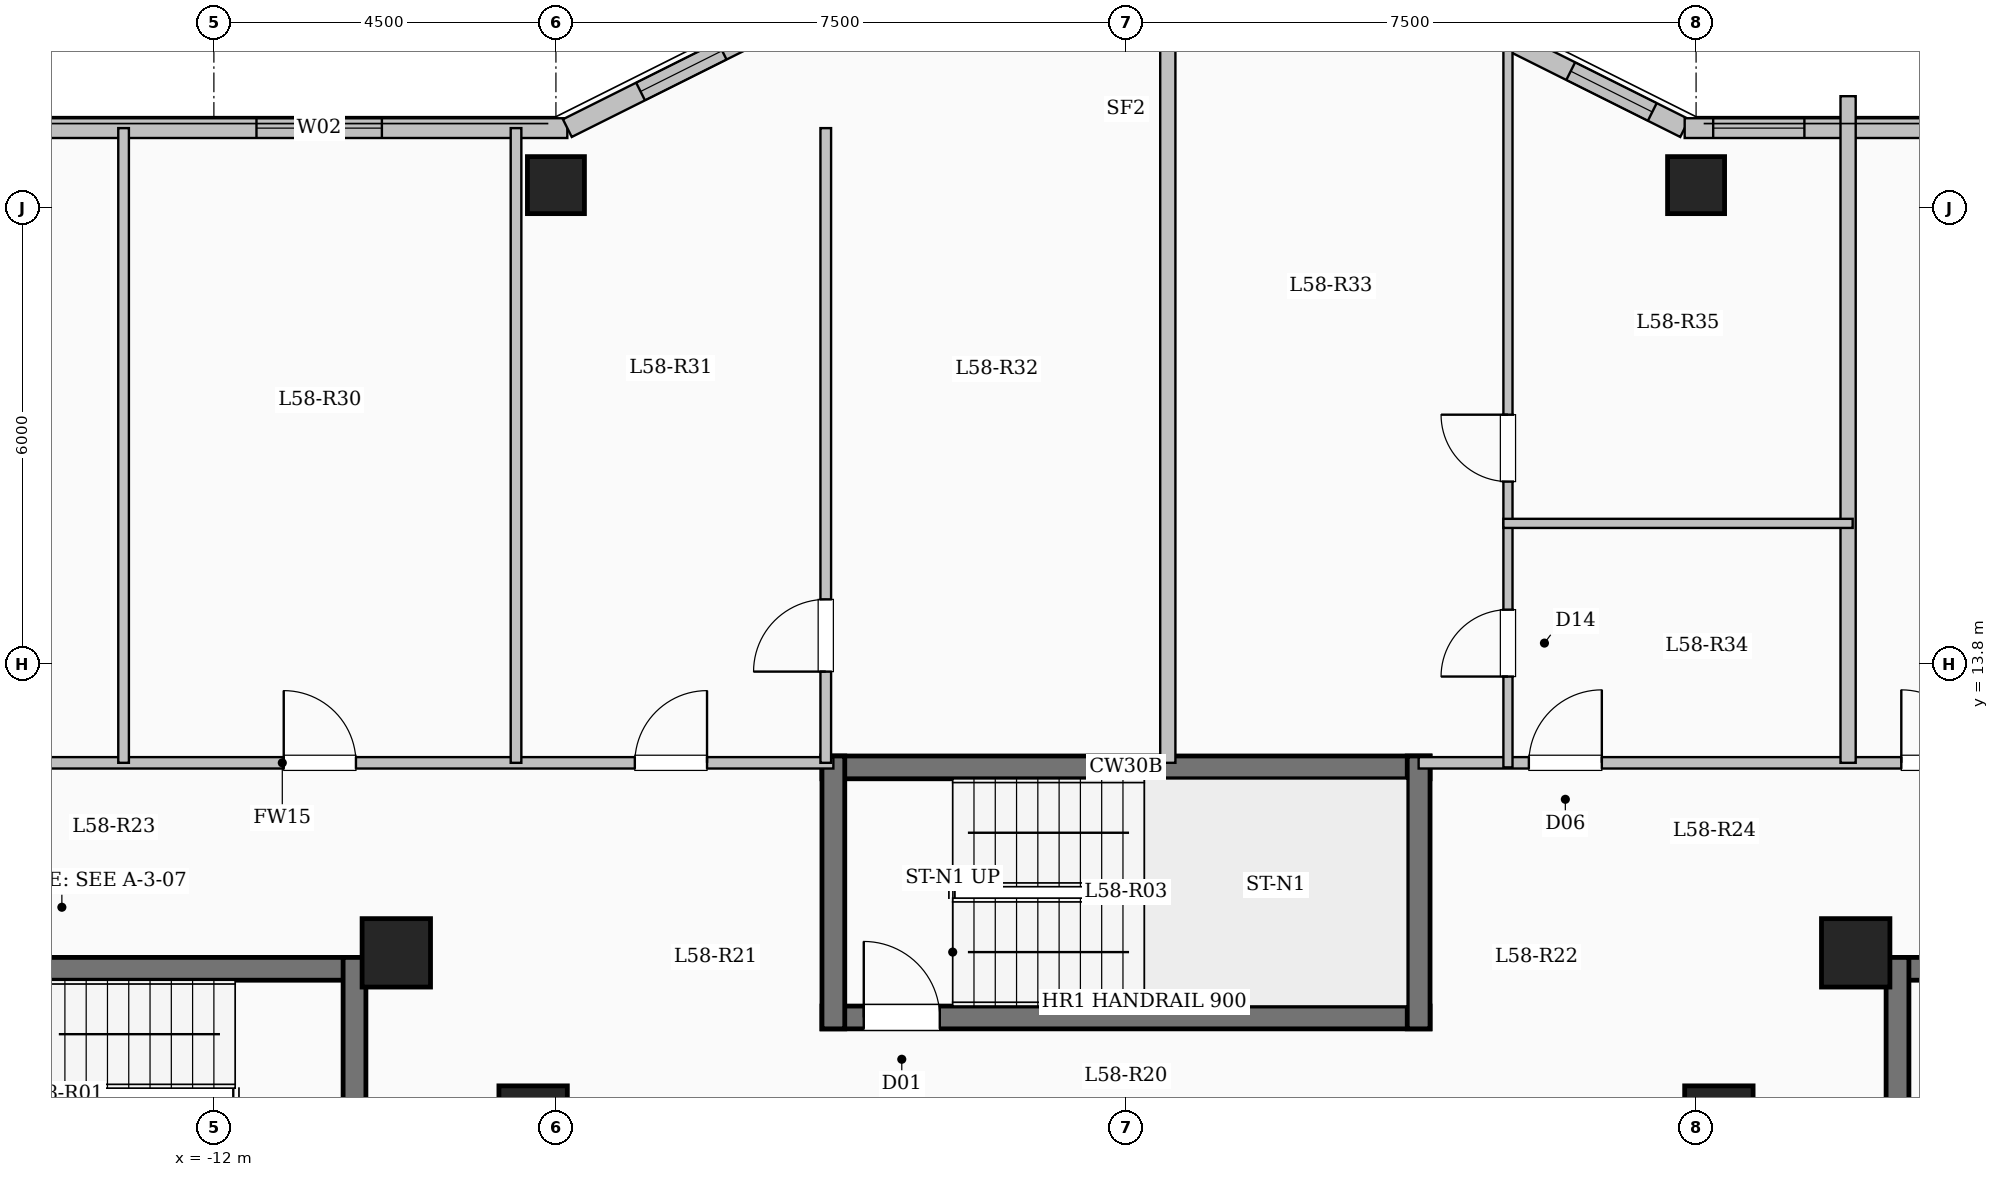
"""IFC4 building model, lengths in metres.
Left out: names, types, materials, properties, quantities, classifications, styles, units other than length and angle.
Written with IfcOpenShell. Run it as: python <this file> out.ifc"""

import sys

from ifc_helpers import new_model, si_unit, direction, frame, frame_2d, origin, origin_2d, place, context, subcontext, project, spatial, rectangle, extrude, element, fill, save


model = new_model("IFC4")
c1 = context("Model", 3, precision=1e-05, world=origin(), true_north=direction((0.0, 1.0)))
c2 = subcontext(c1, "Body", "Model", "MODEL_VIEW")
j1 = project(units=[si_unit("LENGTHUNIT", "METRE"), si_unit("PLANEANGLEUNIT", "RADIAN")], contexts=[c1])
p1 = place(None, origin())
s1 = spatial("IfcSite", under=j1, at=p1, CompositionType="ELEMENT")
p2 = place(p1, origin())
s2 = spatial("IfcBuilding", under=s1, at=p2, CompositionType="ELEMENT")
p3 = place(p2, frame((0.0, 0.0, 213.7)))
s3 = spatial("IfcBuildingStorey", under=s2, at=p3, CompositionType="ELEMENT", Elevation=213.7)
for number, where, z_axis, x_axis in (
    (1, (-7.8, 7.8, 0.0), (0.0, 0.0, 1.0), (1.0, 0.0, 0.0)),
    (2, (7.8, 7.8, 0.0), (0.0, 0.0, 1.0), (1.0, 0.0, 0.0)),
    (3, (-9.6, 10.0, 0.0), (0.0, 0.0, 1.0), (1.0, 0.0, 0.0)),
    (4, (9.6, 10.0, 0.0), (0.0, 0.0, 1.0), (1.0, 0.0, 0.0)),
):
    element("IfcColumn", number, at=place(p3, frame(where, z_axis=z_axis, x_axis=x_axis)), inside=s3, PredefinedType="COLUMN", context=c2, shape_type="SweptSolid", body=[
        extrude(rectangle(XDim=0.9, YDim=0.9, at=origin_2d()), origin(), (0.0, 0.0, 1.0), 3.35),
    ])
for number, where, z_axis, x_axis in (
    (5, (-7.5, 20.1, 0.0), (0.0, 0.0, 1.0), (1.0, 0.0, 0.0)),
    (6, (7.5, 20.1, 0.0), (0.0, 0.0, 1.0), (1.0, 0.0, 0.0)),
):
    element("IfcColumn", number, at=place(p3, frame(where, z_axis=z_axis, x_axis=x_axis)), inside=s3, PredefinedType="COLUMN", context=c2, shape_type="SweptSolid", body=[
        extrude(rectangle(XDim=0.75, YDim=0.75, at=origin_2d()), origin(), (0.0, 0.0, 1.0), 3.35),
    ])
p4 = place(p3, frame((-18.45, 20.85, 0.0), z_axis=(0.0, 0.0, 1.0), x_axis=(1.0, 0.0, 0.0)))
e7 = element("IfcWall", 7, at=p4, inside=s3, PredefinedType="SOLIDWALL", context=c2, shape_type="SweptSolid", body=[
    extrude(rectangle(XDim=11.1, YDim=0.26, at=frame_2d((5.55, 0.0))), origin(), (0.0, 0.0, 1.0), 3.1),
])
p5 = place(p4, frame((1.637, 0.0, 0.9)))
e8 = element("IfcOpeningElement", 8, at=p5, cuts=e7, PredefinedType="OPENING", context=c2, shape_type="SweptSolid", body=[
    extrude(rectangle(XDim=2.0, YDim=1.7, at=frame_2d((1.0, 0.85))), frame((0.0, 0.14, 0.0), z_axis=(0.0, -1.0, 0.0), x_axis=(1.0, 0.0, 0.0)), (0.0, 0.0, 1.0), 0.28),
])
p6 = place(p4, frame((7.01, 0.0, 0.9)))
e9 = element("IfcOpeningElement", 9, at=p6, cuts=e7, PredefinedType="OPENING", context=c2, shape_type="SweptSolid", body=[
    extrude(rectangle(XDim=1.65, YDim=1.6, at=frame_2d((0.825, 0.8))), frame((0.0, 0.14, 0.0), z_axis=(0.0, -1.0, 0.0), x_axis=(1.0, 0.0, 0.0)), (0.0, 0.0, 1.0), 0.28),
])
p7 = place(p3, frame((-7.35, 20.85, 0.0), z_axis=(0.0, 0.0, 1.0), x_axis=(0.894427191, 0.4472135955, 0.0)))
e10 = element("IfcWall", 10, at=p7, inside=s3, PredefinedType="SOLIDWALL", context=c2, shape_type="SweptSolid", body=[
    extrude(rectangle(XDim=3.354, YDim=0.26, at=frame_2d((1.677, 0.0))), origin(), (0.0, 0.0, 1.0), 3.1),
])
p8 = place(p7, frame((1.077, 0.0, 0.95)))
e11 = element("IfcOpeningElement", 11, at=p8, cuts=e10, PredefinedType="OPENING", context=c2, shape_type="SweptSolid", body=[
    extrude(rectangle(XDim=1.2, YDim=1.5, at=frame_2d((0.6, 0.75))), frame((0.0, 0.14, 0.0), z_axis=(0.0, -1.0, 0.0), x_axis=(1.0, 0.0, 0.0)), (0.0, 0.0, 1.0), 0.28),
])
p9 = place(p3, frame((4.35, 22.35, 0.0), z_axis=(0.0, 0.0, 1.0), x_axis=(0.894427191, -0.4472135955, 0.0)))
e12 = element("IfcWall", 12, at=p9, inside=s3, PredefinedType="SOLIDWALL", context=c2, shape_type="SweptSolid", body=[
    extrude(rectangle(XDim=3.354, YDim=0.26, at=frame_2d((1.677, 0.0))), origin(), (0.0, 0.0, 1.0), 3.1),
])
p10 = place(p9, frame((1.678, 0.0, 0.95)))
e13 = element("IfcOpeningElement", 13, at=p10, cuts=e12, PredefinedType="OPENING", context=c2, shape_type="SweptSolid", body=[
    extrude(rectangle(XDim=1.2, YDim=1.5, at=frame_2d((0.6, 0.75))), frame((0.0, 0.14, 0.0), z_axis=(0.0, -1.0, 0.0), x_axis=(1.0, 0.0, 0.0)), (0.0, 0.0, 1.0), 0.28),
])
p11 = place(p3, frame((7.35, 20.85, 0.0), z_axis=(0.0, 0.0, 1.0), x_axis=(1.0, 0.0, 0.0)))
e14 = element("IfcWall", 14, at=p11, inside=s3, PredefinedType="SOLIDWALL", context=c2, shape_type="SweptSolid", body=[
    extrude(rectangle(XDim=11.1, YDim=0.26, at=frame_2d((5.55, 0.0))), origin(), (0.0, 0.0, 1.0), 3.1),
])
p12 = place(p11, frame((0.375, 0.0, 0.95)))
e15 = element("IfcOpeningElement", 15, at=p12, cuts=e14, PredefinedType="OPENING", context=c2, shape_type="SweptSolid", body=[
    extrude(rectangle(XDim=1.2, YDim=1.5, at=frame_2d((0.6, 0.75))), frame((0.0, 0.14, 0.0), z_axis=(0.0, -1.0, 0.0), x_axis=(1.0, 0.0, 0.0)), (0.0, 0.0, 1.0), 0.28),
])
p13 = place(p11, frame((3.245, 0.0, 0.9)))
e16 = element("IfcOpeningElement", 16, at=p13, cuts=e14, PredefinedType="OPENING", context=c2, shape_type="SweptSolid", body=[
    extrude(rectangle(XDim=2.2, YDim=1.75, at=frame_2d((1.1, 0.875))), frame((0.0, 0.14, 0.0), z_axis=(0.0, -1.0, 0.0), x_axis=(1.0, 0.0, 0.0)), (0.0, 0.0, 1.0), 0.28),
])
p14 = place(p11, frame((7.965, 0.0, 0.9)))
e17 = element("IfcOpeningElement", 17, at=p14, cuts=e14, PredefinedType="OPENING", context=c2, shape_type="SweptSolid", body=[
    extrude(rectangle(XDim=1.65, YDim=1.6, at=frame_2d((0.825, 0.8))), frame((0.0, 0.14, 0.0), z_axis=(0.0, -1.0, 0.0), x_axis=(1.0, 0.0, 0.0)), (0.0, 0.0, 1.0), 0.28),
])
p15 = place(p3, frame((-18.0, 9.79, 0.0), z_axis=(0.0, 0.0, 1.0), x_axis=(1.0, 0.0, 0.0)))
e18 = element("IfcWall", 18, at=p15, inside=s3, PredefinedType="SHEAR", context=c2, shape_type="SweptSolid", body=[
    extrude(rectangle(XDim=8.0, YDim=0.3, at=frame_2d((4.0, 0.0))), origin(), (0.0, 0.0, 1.0), 3.35),
])
p16 = place(p3, frame((-10.15, 6.35, 0.0), z_axis=(0.0, 0.0, 1.0), x_axis=(0.0, 1.0, 0.0)))
e19 = element("IfcWall", 19, at=p16, inside=s3, PredefinedType="SHEAR", context=c2, shape_type="SweptSolid", body=[
    extrude(rectangle(XDim=3.59, YDim=0.3, at=frame_2d((1.795, 0.0))), origin(), (0.0, 0.0, 1.0), 3.35),
])
p17 = place(p3, frame((10.0, 9.79, 0.0), z_axis=(0.0, 0.0, 1.0), x_axis=(1.0, 0.0, 0.0)))
e20 = element("IfcWall", 20, at=p17, inside=s3, PredefinedType="SHEAR", context=c2, shape_type="SweptSolid", body=[
    extrude(rectangle(XDim=8.0, YDim=0.3, at=frame_2d((4.0, 0.0))), origin(), (0.0, 0.0, 1.0), 3.35),
])
p18 = place(p3, frame((10.15, 6.35, 0.0), z_axis=(0.0, 0.0, 1.0), x_axis=(0.0, 1.0, 0.0)))
e21 = element("IfcWall", 21, at=p18, inside=s3, PredefinedType="SHEAR", context=c2, shape_type="SweptSolid", body=[
    extrude(rectangle(XDim=3.59, YDim=0.3, at=frame_2d((1.795, 0.0))), origin(), (0.0, 0.0, 1.0), 3.35),
])
p19 = place(p3, frame((-4.0, 12.44, 0.0), z_axis=(0.0, 0.0, 1.0), x_axis=(1.0, 0.0, 0.0)))
e22 = element("IfcWall", 22, at=p19, inside=s3, PredefinedType="SHEAR", context=c2, shape_type="SweptSolid", body=[
    extrude(rectangle(XDim=8.0, YDim=0.3, at=frame_2d((4.0, 0.0))), origin(), (0.0, 0.0, 1.0), 3.35),
])
p20 = place(p3, frame((-4.0, 9.15, 0.0), z_axis=(0.0, 0.0, 1.0), x_axis=(1.0, 0.0, 0.0)))
e23 = element("IfcWall", 23, at=p20, inside=s3, PredefinedType="SHEAR", context=c2, shape_type="SweptSolid", body=[
    extrude(rectangle(XDim=8.0, YDim=0.3, at=frame_2d((4.0, 0.0))), origin(), (0.0, 0.0, 1.0), 3.35),
])
p21 = place(p20, frame((0.55, 0.0, 0.0)))
e24 = element("IfcOpeningElement", 24, at=p21, cuts=e23, PredefinedType="OPENING", context=c2, shape_type="SweptSolid", body=[
    extrude(rectangle(XDim=1.0, YDim=2.15, at=frame_2d((0.5, 1.075))), frame((0.0, 0.16, 0.0), z_axis=(0.0, -1.0, 0.0), x_axis=(1.0, 0.0, 0.0)), (0.0, 0.0, 1.0), 0.32),
])
for number, where, z_axis, x_axis in (
    (25, (-3.85, 9.0, 0.0), (0.0, 0.0, 1.0), (0.0, 1.0, 0.0)),
    (26, (3.85, 9.0, 0.0), (0.0, 0.0, 1.0), (0.0, 1.0, 0.0)),
):
    element("IfcWall", number, at=place(p3, frame(where, z_axis=z_axis, x_axis=x_axis)), inside=s3, PredefinedType="SHEAR", context=c2, shape_type="SweptSolid", body=[
        extrude(rectangle(XDim=3.59, YDim=0.3, at=frame_2d((1.795, 0.0))), origin(), (0.0, 0.0, 1.0), 3.35),
    ])
p22 = place(p3, frame((-18.35, 12.5, 0.0), z_axis=(0.0, 0.0, 1.0), x_axis=(1.0, 0.0, 0.0)))
e27 = element("IfcWall", 27, at=p22, inside=s3, PredefinedType="PARTITIONING", context=c2, shape_type="SweptSolid", body=[
    extrude(rectangle(XDim=14.5, YDim=0.15, at=frame_2d((7.25, 0.0))), origin(), (0.0, 0.0, 1.0), 3.1),
])
p23 = place(p22, frame((2.076, 0.0, 0.0)))
e28 = element("IfcOpeningElement", 28, at=p23, cuts=e27, PredefinedType="OPENING", context=c2, shape_type="SweptSolid", body=[
    extrude(rectangle(XDim=0.95, YDim=2.15, at=frame_2d((0.475, 1.075))), frame((0.0, 0.085, 0.0), z_axis=(0.0, -1.0, 0.0), x_axis=(1.0, 0.0, 0.0)), (0.0, 0.0, 1.0), 0.17),
])
p24 = place(p22, frame((7.269, 0.0, 0.0)))
e29 = element("IfcOpeningElement", 29, at=p24, cuts=e27, PredefinedType="OPENING", context=c2, shape_type="SweptSolid", body=[
    extrude(rectangle(XDim=0.95, YDim=2.15, at=frame_2d((0.475, 1.075))), frame((0.0, 0.085, 0.0), z_axis=(0.0, -1.0, 0.0), x_axis=(1.0, 0.0, 0.0)), (0.0, 0.0, 1.0), 0.17),
])
p25 = place(p22, frame((11.888, 0.0, 0.0)))
e30 = element("IfcOpeningElement", 30, at=p25, cuts=e27, PredefinedType="OPENING", context=c2, shape_type="SweptSolid", body=[
    extrude(rectangle(XDim=0.95, YDim=2.15, at=frame_2d((0.475, 1.075))), frame((0.0, 0.085, 0.0), z_axis=(0.0, -1.0, 0.0), x_axis=(1.0, 0.0, 0.0)), (0.0, 0.0, 1.0), 0.17),
])
p26 = place(p3, frame((3.85, 12.5, 0.0), z_axis=(0.0, 0.0, 1.0), x_axis=(1.0, 0.0, 0.0)))
e31 = element("IfcWall", 31, at=p26, inside=s3, PredefinedType="PARTITIONING", context=c2, shape_type="SweptSolid", body=[
    extrude(rectangle(XDim=14.5, YDim=0.15, at=frame_2d((7.25, 0.0))), origin(), (0.0, 0.0, 1.0), 3.1),
])
p27 = place(p26, frame((1.45, 0.0, 0.0)))
e32 = element("IfcOpeningElement", 32, at=p27, cuts=e31, PredefinedType="OPENING", context=c2, shape_type="SweptSolid", body=[
    extrude(rectangle(XDim=0.96, YDim=2.15, at=frame_2d((0.48, 1.075))), frame((0.0, 0.085, 0.0), z_axis=(0.0, -1.0, 0.0), x_axis=(1.0, 0.0, 0.0)), (0.0, 0.0, 1.0), 0.17),
])
p28 = place(p26, frame((6.35, 0.0, 0.0)))
e33 = element("IfcOpeningElement", 33, at=p28, cuts=e31, PredefinedType="OPENING", context=c2, shape_type="SweptSolid", body=[
    extrude(rectangle(XDim=0.96, YDim=2.15, at=frame_2d((0.48, 1.075))), frame((0.0, 0.085, 0.0), z_axis=(0.0, -1.0, 0.0), x_axis=(1.0, 0.0, 0.0)), (0.0, 0.0, 1.0), 0.17),
])
p29 = place(p3, frame((0.55, 12.5, 0.0), z_axis=(0.0, 0.0, 1.0), x_axis=(0.0, 1.0, 0.0)))
e34 = element("IfcWall", 34, at=p29, inside=s3, PredefinedType="SOLIDWALL", context=c2, shape_type="SweptSolid", body=[
    extrude(rectangle(XDim=9.88, YDim=0.2, at=frame_2d((4.94, 0.0))), origin(), (0.0, 0.0, 1.0), 3.1),
])
p30 = place(p3, frame((-3.95, 12.5, 0.0), z_axis=(0.0, 0.0, 1.0), x_axis=(0.0, 1.0, 0.0)))
e35 = element("IfcWall", 35, at=p30, inside=s3, PredefinedType="PARTITIONING", context=c2, shape_type="SweptSolid", body=[
    extrude(rectangle(XDim=8.35, YDim=0.14, at=frame_2d((4.175, 0.0))), origin(), (0.0, 0.0, 1.0), 3.1),
])
p31 = place(p30, frame((1.2, 0.0, 0.0)))
e36 = element("IfcOpeningElement", 36, at=p31, cuts=e35, PredefinedType="OPENING", context=c2, shape_type="SweptSolid", body=[
    extrude(rectangle(XDim=0.95, YDim=2.15, at=frame_2d((0.475, 1.075))), frame((0.0, 0.08, 0.0), z_axis=(0.0, -1.0, 0.0), x_axis=(1.0, 0.0, 0.0)), (0.0, 0.0, 1.0), 0.16),
])
p32 = place(p3, frame((-13.188, 12.5, 0.0), z_axis=(0.0, 0.0, 1.0), x_axis=(0.0, 1.0, 0.0)))
e37 = element("IfcWall", 37, at=p32, inside=s3, PredefinedType="PARTITIONING", context=c2, shape_type="SweptSolid", body=[
    extrude(rectangle(XDim=8.35, YDim=0.14, at=frame_2d((4.175, 0.0))), origin(), (0.0, 0.0, 1.0), 3.1),
])
p33 = place(p3, frame((-8.025, 12.5, 0.0), z_axis=(0.0, 0.0, 1.0), x_axis=(0.0, 1.0, 0.0)))
e38 = element("IfcWall", 38, at=p33, inside=s3, PredefinedType="PARTITIONING", context=c2, shape_type="SweptSolid", body=[
    extrude(rectangle(XDim=8.35, YDim=0.14, at=frame_2d((4.175, 0.0))), origin(), (0.0, 0.0, 1.0), 2.585),
])
p34 = place(p3, frame((9.5, 12.5, 0.0), z_axis=(0.0, 0.0, 1.0), x_axis=(0.0, 1.0, 0.0)))
e39 = element("IfcWall", 39, at=p34, inside=s3, PredefinedType="SOLIDWALL", context=c2, shape_type="SweptSolid", body=[
    extrude(rectangle(XDim=8.77, YDim=0.2, at=frame_2d((4.385, 0.0))), origin(), (0.0, 0.0, 1.0), 3.1),
])
p35 = place(p3, frame((5.025, 12.44, 0.0), z_axis=(0.0, 0.0, 1.0), x_axis=(0.0, 1.0, 0.0)))
e40 = element("IfcWall", 40, at=p35, inside=s3, PredefinedType="PARTITIONING", context=c2, shape_type="SweptSolid", body=[
    extrude(rectangle(XDim=3.21, YDim=0.12, at=frame_2d((1.605, 0.0))), origin(), (0.0, 0.0, 1.0), 3.1),
])
p36 = place(p35, frame((1.195, 0.0, 0.0)))
e41 = element("IfcOpeningElement", 41, at=p36, cuts=e40, PredefinedType="OPENING", context=c2, shape_type="SweptSolid", body=[
    extrude(rectangle(XDim=0.88, YDim=2.1, at=frame_2d((0.44, 1.05))), frame((0.0, 0.07, 0.0), z_axis=(0.0, -1.0, 0.0), x_axis=(1.0, 0.0, 0.0)), (0.0, 0.0, 1.0), 0.14),
])
p37 = place(p3, frame((5.025, 15.65, 0.0), z_axis=(0.0, 0.0, 1.0), x_axis=(0.0, 1.0, 0.0)))
e42 = element("IfcWall", 42, at=p37, inside=s3, PredefinedType="PARTITIONING", context=c2, shape_type="SweptSolid", body=[
    extrude(rectangle(XDim=6.724, YDim=0.12, at=frame_2d((3.362, 0.0))), origin(), (0.0, 0.0, 1.0), 3.1),
])
p38 = place(p37, frame((0.55, 0.0, 0.0)))
e43 = element("IfcOpeningElement", 43, at=p38, cuts=e42, PredefinedType="OPENING", context=c2, shape_type="SweptSolid", body=[
    extrude(rectangle(XDim=0.88, YDim=2.1, at=frame_2d((0.44, 1.05))), frame((0.0, 0.07, 0.0), z_axis=(0.0, -1.0, 0.0), x_axis=(1.0, 0.0, 0.0)), (0.0, 0.0, 1.0), 0.14),
])
p39 = place(p3, frame((4.965, 15.65, 0.0), z_axis=(0.0, 0.0, 1.0), x_axis=(1.0, 0.0, 0.0)))
e44 = element("IfcWall", 44, at=p39, inside=s3, PredefinedType="PARTITIONING", context=c2, shape_type="SweptSolid", body=[
    extrude(rectangle(XDim=4.595, YDim=0.12, at=frame_2d((2.297, 0.0))), origin(), (0.0, 0.0, 1.0), 2.725),
])
p40 = place(p6, origin())
e45 = element("IfcWindow", 45, at=p40, inside=s3, PartitioningType="SINGLE_PANEL", PredefinedType="WINDOW", context=c2, shape_type="SweptSolid", body=[
    extrude(rectangle(XDim=1.65, YDim=1.6, at=frame_2d((0.825, 0.8))), frame((0.0, 0.03, 0.0), z_axis=(0.0, -1.0, 0.0), x_axis=(1.0, 0.0, 0.0)), (0.0, 0.0, 1.0), 0.06),
])
fill(e9, e45)
p41 = place(p8, origin())
e46 = element("IfcWindow", 46, at=p41, inside=s3, PartitioningType="SINGLE_PANEL", PredefinedType="WINDOW", context=c2, shape_type="SweptSolid", body=[
    extrude(rectangle(XDim=1.2, YDim=1.5, at=frame_2d((0.6, 0.75))), frame((0.0, 0.03, 0.0), z_axis=(0.0, -1.0, 0.0), x_axis=(1.0, 0.0, 0.0)), (0.0, 0.0, 1.0), 0.06),
])
fill(e11, e46)
p42 = place(p10, origin())
e47 = element("IfcWindow", 47, at=p42, inside=s3, PartitioningType="SINGLE_PANEL", PredefinedType="WINDOW", context=c2, shape_type="SweptSolid", body=[
    extrude(rectangle(XDim=1.2, YDim=1.5, at=frame_2d((0.6, 0.75))), frame((0.0, 0.03, 0.0), z_axis=(0.0, -1.0, 0.0), x_axis=(1.0, 0.0, 0.0)), (0.0, 0.0, 1.0), 0.06),
])
fill(e13, e47)
p43 = place(p12, origin())
e48 = element("IfcWindow", 48, at=p43, inside=s3, PartitioningType="SINGLE_PANEL", PredefinedType="WINDOW", context=c2, shape_type="SweptSolid", body=[
    extrude(rectangle(XDim=1.2, YDim=1.5, at=frame_2d((0.6, 0.75))), frame((0.0, 0.03, 0.0), z_axis=(0.0, -1.0, 0.0), x_axis=(1.0, 0.0, 0.0)), (0.0, 0.0, 1.0), 0.06),
])
fill(e15, e48)
p44 = place(p21, origin())
e49 = element("IfcDoor", 49, at=p44, inside=s3, OperationType="SINGLE_SWING_LEFT", PredefinedType="DOOR", context=c2, shape_type="SweptSolid", body=[
    extrude(rectangle(XDim=1.0, YDim=2.15, at=frame_2d((0.5, 1.075))), frame((0.0, 0.025, 0.0), z_axis=(0.0, -1.0, 0.0), x_axis=(1.0, 0.0, 0.0)), (0.0, 0.0, 1.0), 0.05),
])
fill(e24, e49)
p45 = place(p24, origin())
e50 = element("IfcDoor", 50, at=p45, inside=s3, OperationType="SINGLE_SWING_LEFT", PredefinedType="DOOR", context=c2, shape_type="SweptSolid", body=[
    extrude(rectangle(XDim=0.95, YDim=2.15, at=frame_2d((0.475, 1.075))), frame((0.0, 0.025, 0.0), z_axis=(0.0, -1.0, 0.0), x_axis=(1.0, 0.0, 0.0)), (0.0, 0.0, 1.0), 0.05),
])
fill(e29, e50)
p46 = place(p25, origin())
e51 = element("IfcDoor", 51, at=p46, inside=s3, OperationType="SINGLE_SWING_RIGHT", PredefinedType="DOOR", context=c2, shape_type="SweptSolid", body=[
    extrude(rectangle(XDim=0.95, YDim=2.15, at=frame_2d((0.475, 1.075))), frame((0.0, 0.025, 0.0), z_axis=(0.0, -1.0, 0.0), x_axis=(1.0, 0.0, 0.0)), (0.0, 0.0, 1.0), 0.05),
])
fill(e30, e51)
p47 = place(p31, origin())
e52 = element("IfcDoor", 52, at=p47, inside=s3, OperationType="SINGLE_SWING_LEFT", PredefinedType="DOOR", context=c2, shape_type="SweptSolid", body=[
    extrude(rectangle(XDim=0.95, YDim=2.15, at=frame_2d((0.475, 1.075))), frame((0.0, 0.025, 0.0), z_axis=(0.0, -1.0, 0.0), x_axis=(1.0, 0.0, 0.0)), (0.0, 0.0, 1.0), 0.05),
])
fill(e36, e52)
p48 = place(p27, origin())
e53 = element("IfcDoor", 53, at=p48, inside=s3, OperationType="SINGLE_SWING_RIGHT", PredefinedType="DOOR", context=c2, shape_type="SweptSolid", body=[
    extrude(rectangle(XDim=0.96, YDim=2.15, at=frame_2d((0.48, 1.075))), frame((0.0, 0.025, 0.0), z_axis=(0.0, -1.0, 0.0), x_axis=(1.0, 0.0, 0.0)), (0.0, 0.0, 1.0), 0.05),
])
fill(e32, e53)
p49 = place(p36, origin())
e54 = element("IfcDoor", 54, at=p49, inside=s3, OperationType="SINGLE_SWING_LEFT", PredefinedType="DOOR", context=c2, shape_type="SweptSolid", body=[
    extrude(rectangle(XDim=0.88, YDim=2.1, at=frame_2d((0.44, 1.05))), frame((0.0, 0.025, 0.0), z_axis=(0.0, -1.0, 0.0), x_axis=(1.0, 0.0, 0.0)), (0.0, 0.0, 1.0), 0.05),
])
fill(e41, e54)
p50 = place(p38, origin())
e55 = element("IfcDoor", 55, at=p50, inside=s3, OperationType="SINGLE_SWING_RIGHT", PredefinedType="DOOR", context=c2, shape_type="SweptSolid", body=[
    extrude(rectangle(XDim=0.88, YDim=2.1, at=frame_2d((0.44, 1.05))), frame((0.0, 0.025, 0.0), z_axis=(0.0, -1.0, 0.0), x_axis=(1.0, 0.0, 0.0)), (0.0, 0.0, 1.0), 0.05),
])
fill(e43, e55)
p51 = place(p28, origin())
e56 = element("IfcDoor", 56, at=p51, inside=s3, OperationType="SINGLE_SWING_LEFT", PredefinedType="DOOR", context=c2, shape_type="SweptSolid", body=[
    extrude(rectangle(XDim=0.96, YDim=2.15, at=frame_2d((0.48, 1.075))), frame((0.0, 0.025, 0.0), z_axis=(0.0, -1.0, 0.0), x_axis=(1.0, 0.0, 0.0)), (0.0, 0.0, 1.0), 0.05),
])
fill(e33, e56)
save(model, sys.argv[1])
